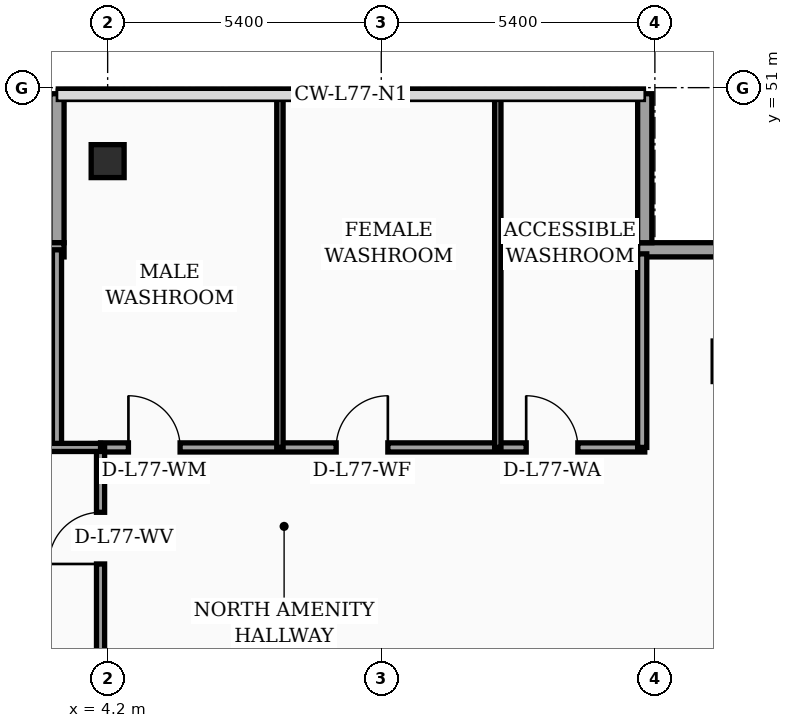
"""IFC4 building model, lengths in metres.
Left out: names, types, materials, properties, quantities, classifications, styles, units other than length and angle.
Written with IfcOpenShell. Run it as: python <this file> out.ifc"""

import sys

from ifc_helpers import new_model, si_unit, direction, frame, frame_2d, origin, origin_2d, place, context, subcontext, project, spatial, rectangle, hollow_rectangle, extrude, element, fill, save


model = new_model("IFC4")
c1 = context("Model", 3, precision=1e-05, world=origin(), true_north=direction((0.0, 1.0)))
c2 = subcontext(c1, "Body", "Model", "MODEL_VIEW")
j1 = project(units=[si_unit("LENGTHUNIT", "METRE"), si_unit("PLANEANGLEUNIT", "RADIAN")], contexts=[c1])
p1 = place(None, origin())
s1 = spatial("IfcSite", under=j1, at=p1, CompositionType="ELEMENT")
p2 = place(p1, origin())
s2 = spatial("IfcBuilding", under=s1, at=p2, CompositionType="ELEMENT")
p3 = place(p2, frame((0.0, 0.0, 311.5)))
s3 = spatial("IfcBuildingStorey", under=s2, at=p3, CompositionType="ELEMENT", Elevation=311.5)
p4 = place(p3, frame((4.2, 49.55, 0.0), z_axis=(0.0, 0.0, 1.0), x_axis=(1.0, 0.0, 0.0)))
e1 = element("IfcColumn", 1, at=p4, inside=s3, PredefinedType="COLUMN", context=c2, shape_type="SweptSolid", body=[
    extrude(hollow_rectangle(XDim=0.65, YDim=0.65, WallThickness=0.028, at=origin_2d()), origin(), (0.0, 0.0, 1.0), 4.26),
])
p5 = place(p3, frame((17.9, 47.8, 0.0), z_axis=(0.0, 0.0, 1.0), x_axis=(-1.0, 0.0, 0.0)))
e2 = element("IfcWall", 2, at=p5, inside=s3, PredefinedType="SOLIDWALL", context=c2, shape_type="SweptSolid", body=[
    extrude(rectangle(XDim=3.24, YDim=0.28, at=frame_2d((1.62, 0.0))), origin(), (0.0, 0.0, 1.0), 4.26),
])
p6 = place(p3, frame((14.8, 47.94, 0.0), z_axis=(0.0, 0.0, 1.0), x_axis=(0.0, 1.0, 0.0)))
e3 = element("IfcWall", 3, at=p6, inside=s3, PredefinedType="SOLIDWALL", context=c2, shape_type="SweptSolid", body=[
    extrude(rectangle(XDim=2.94, YDim=0.28, at=frame_2d((1.47, 0.0))), origin(), (0.0, 0.0, 1.0), 4.26),
])
p7 = place(p3, frame((3.2, 50.88, 0.0), z_axis=(0.0, 0.0, 1.0), x_axis=(0.0, -1.0, 0.0)))
e4 = element("IfcWall", 4, at=p7, inside=s3, PredefinedType="SOLIDWALL", context=c2, shape_type="SweptSolid", body=[
    extrude(rectangle(XDim=2.94, YDim=0.28, at=frame_2d((1.47, 0.0))), origin(), (0.0, 0.0, 1.0), 3.79),
])
p8 = place(p3, frame((3.34, 47.8, 0.0), z_axis=(0.0, 0.0, 1.0), x_axis=(-1.0, 0.0, 0.0)))
e5 = element("IfcWall", 5, at=p8, inside=s3, PredefinedType="SOLIDWALL", context=c2, shape_type="SweptSolid", body=[
    extrude(rectangle(XDim=3.22, YDim=0.28, at=frame_2d((1.61, 0.0))), origin(), (0.0, 0.0, 1.0), 3.79),
])
p9 = place(p3, frame((3.2, 43.9, 0.0), z_axis=(0.0, 0.0, 1.0), x_axis=(0.0, 1.0, 0.0)))
e6 = element("IfcWall", 6, at=p9, inside=s3, PredefinedType="PARTITIONING", context=c2, shape_type="SweptSolid", body=[
    extrude(rectangle(XDim=3.9, YDim=0.18, at=frame_2d((1.95, 0.0))), origin(), (0.0, 0.0, 1.0), 4.26),
])
p10 = place(p3, frame((4.06, 43.9, 0.0), z_axis=(0.0, 0.0, 1.0), x_axis=(1.0, 0.0, 0.0)))
e7 = element("IfcWall", 7, at=p10, inside=s3, PredefinedType="PARTITIONING", context=c2, shape_type="SweptSolid", body=[
    extrude(rectangle(XDim=10.74, YDim=0.18, at=frame_2d((5.37, 0.0))), origin(), (0.0, 0.0, 1.0), 3.69),
])
p11 = place(p10, frame((0.55, 0.0, 0.0)))
e8 = element("IfcOpeningElement", 8, at=p11, cuts=e7, PredefinedType="OPENING", context=c2, shape_type="SweptSolid", body=[
    extrude(rectangle(XDim=1.02, YDim=2.2, at=frame_2d((0.51, 1.1))), frame((0.0, 0.1, 0.0), z_axis=(0.0, -1.0, 0.0), x_axis=(1.0, 0.0, 0.0)), (0.0, 0.0, 1.0), 0.2),
])
p12 = place(p10, frame((4.65, 0.0, 0.0)))
e9 = element("IfcOpeningElement", 9, at=p12, cuts=e7, PredefinedType="OPENING", context=c2, shape_type="SweptSolid", body=[
    extrude(rectangle(XDim=1.02, YDim=2.2, at=frame_2d((0.51, 1.1))), frame((0.0, 0.1, 0.0), z_axis=(0.0, -1.0, 0.0), x_axis=(1.0, 0.0, 0.0)), (0.0, 0.0, 1.0), 0.2),
])
p13 = place(p10, frame((8.4, 0.0, 0.0)))
e10 = element("IfcOpeningElement", 10, at=p13, cuts=e7, PredefinedType="OPENING", context=c2, shape_type="SweptSolid", body=[
    extrude(rectangle(XDim=1.02, YDim=2.2, at=frame_2d((0.51, 1.1))), frame((0.0, 0.1, 0.0), z_axis=(0.0, -1.0, 0.0), x_axis=(1.0, 0.0, 0.0)), (0.0, 0.0, 1.0), 0.2),
])
p14 = place(p3, frame((4.06, 38.4, 0.0), z_axis=(0.0, 0.0, 1.0), x_axis=(0.0, 1.0, 0.0)))
e11 = element("IfcWall", 11, at=p14, inside=s3, PredefinedType="PARTITIONING", context=c2, shape_type="SweptSolid", body=[
    extrude(rectangle(XDim=5.5, YDim=0.16, at=frame_2d((2.75, 0.0))), origin(), (0.0, 0.0, 1.0), 3.69),
])
p15 = place(p14, frame((3.2, 0.0, 0.0)))
e12 = element("IfcOpeningElement", 12, at=p15, cuts=e11, PredefinedType="OPENING", context=c2, shape_type="SweptSolid", body=[
    extrude(rectangle(XDim=1.02, YDim=2.2, at=frame_2d((0.51, 1.1))), frame((0.0, 0.09, 0.0), z_axis=(0.0, -1.0, 0.0), x_axis=(1.0, 0.0, 0.0)), (0.0, 0.0, 1.0), 0.18),
])
p16 = place(p3, frame((0.08, 43.9, 0.0), z_axis=(0.0, 0.0, 1.0), x_axis=(1.0, 0.0, 0.0)))
e13 = element("IfcWall", 13, at=p16, inside=s3, PredefinedType="PARTITIONING", context=c2, shape_type="SweptSolid", body=[
    extrude(rectangle(XDim=3.98, YDim=0.16, at=frame_2d((1.99, 0.0))), origin(), (0.0, 0.0, 1.0), 3.69),
])
p17 = place(p3, frame((14.75, 43.9, 0.0), z_axis=(0.0, 0.0, 1.0), x_axis=(0.0, 1.0, 0.0)))
e14 = element("IfcWall", 14, at=p17, inside=s3, PredefinedType="PARTITIONING", context=c2, shape_type="SweptSolid", body=[
    extrude(rectangle(XDim=3.82, YDim=0.18, at=frame_2d((1.91, 0.0))), origin(), (0.0, 0.0, 1.0), 3.79),
])
for number, where, z_axis, x_axis in (
    (15, (7.6, 43.9, 0.0), (0.0, 0.0, 1.0), (0.0, 1.0, 0.0)),
    (16, (11.9, 43.9, 0.0), (0.0, 0.0, 1.0), (0.0, 1.0, 0.0)),
):
    element("IfcWall", number, at=place(p3, frame(where, z_axis=z_axis, x_axis=x_axis)), inside=s3, PredefinedType="PARTITIONING", context=c2, shape_type="SweptSolid", body=[
        extrude(rectangle(XDim=7.04, YDim=0.125, at=frame_2d((3.52, 0.0))), origin(), (0.0, 0.0, 1.0), 3.79),
    ])
p18 = place(p11, origin())
e17 = element("IfcDoor", 17, at=p18, inside=s3, OperationType="SINGLE_SWING_LEFT", PredefinedType="DOOR", context=c2, shape_type="SweptSolid", body=[
    extrude(rectangle(XDim=1.02, YDim=2.2, at=frame_2d((0.51, 1.1))), frame((0.0, 0.025, 0.0), z_axis=(0.0, -1.0, 0.0), x_axis=(1.0, 0.0, 0.0)), (0.0, 0.0, 1.0), 0.05),
])
fill(e8, e17)
p19 = place(p12, origin())
e18 = element("IfcDoor", 18, at=p19, inside=s3, OperationType="SINGLE_SWING_RIGHT", PredefinedType="DOOR", context=c2, shape_type="SweptSolid", body=[
    extrude(rectangle(XDim=1.02, YDim=2.2, at=frame_2d((0.51, 1.1))), frame((0.0, 0.025, 0.0), z_axis=(0.0, -1.0, 0.0), x_axis=(1.0, 0.0, 0.0)), (0.0, 0.0, 1.0), 0.05),
])
fill(e9, e18)
p20 = place(p13, origin())
e19 = element("IfcDoor", 19, at=p20, inside=s3, OperationType="SINGLE_SWING_LEFT", PredefinedType="DOOR", context=c2, shape_type="SweptSolid", body=[
    extrude(rectangle(XDim=1.02, YDim=2.2, at=frame_2d((0.51, 1.1))), frame((0.0, 0.025, 0.0), z_axis=(0.0, -1.0, 0.0), x_axis=(1.0, 0.0, 0.0)), (0.0, 0.0, 1.0), 0.05),
])
fill(e10, e19)
p21 = place(p15, origin())
e20 = element("IfcDoor", 20, at=p21, inside=s3, OperationType="SINGLE_SWING_LEFT", PredefinedType="DOOR", context=c2, shape_type="SweptSolid", body=[
    extrude(rectangle(XDim=1.02, YDim=2.2, at=frame_2d((0.51, 1.1))), frame((0.0, 0.025, 0.0), z_axis=(0.0, -1.0, 0.0), x_axis=(1.0, 0.0, 0.0)), (0.0, 0.0, 1.0), 0.05),
])
fill(e12, e20)
save(model, sys.argv[1])
